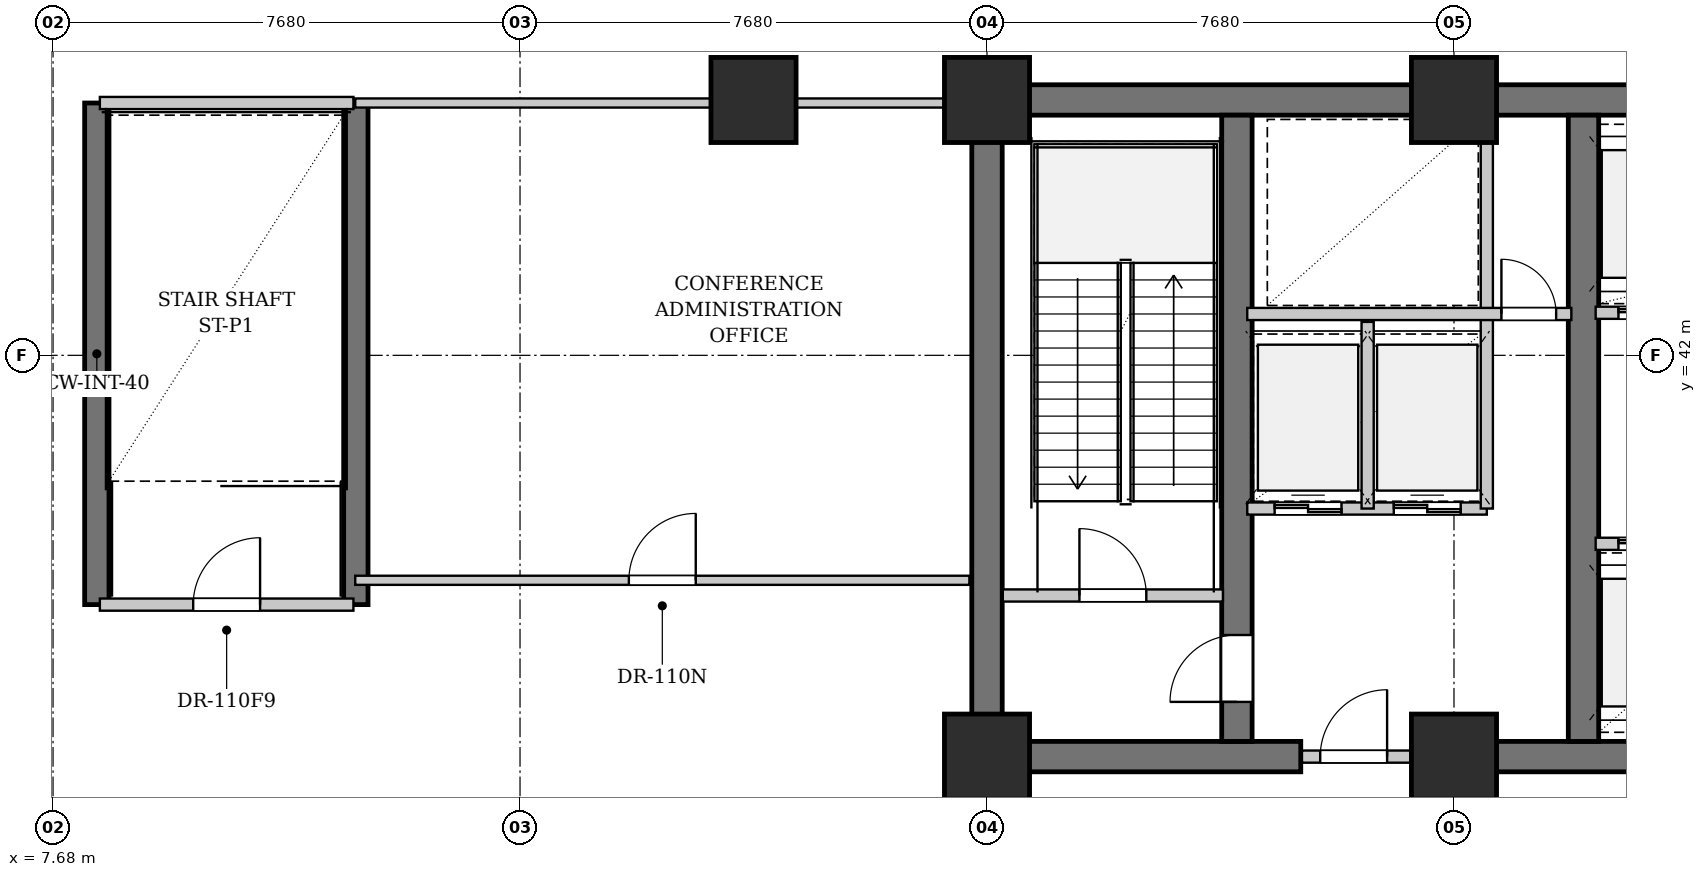
"""IFC4 building model, lengths in metres.
Left out: names, types, materials, properties, quantities, classifications, styles, units other than length and angle.
Written with IfcOpenShell. Run it as: python <this file> out.ifc"""

import sys

from ifc_helpers import new_model, si_unit, direction, frame, frame_2d, origin, origin_2d, place, context, subcontext, project, spatial, rectangle, extrude, element, fill, save


model = new_model("IFC4")
c1 = context("Model", 3, precision=1e-05, world=origin(), true_north=direction((0.0, 1.0)))
c2 = subcontext(c1, "Body", "Model", "MODEL_VIEW")
j1 = project(units=[si_unit("LENGTHUNIT", "METRE"), si_unit("PLANEANGLEUNIT", "RADIAN")], contexts=[c1])
p1 = place(None, origin())
s1 = spatial("IfcSite", under=j1, at=p1, CompositionType="ELEMENT")
p2 = place(p1, origin())
s2 = spatial("IfcBuilding", under=s1, at=p2, CompositionType="ELEMENT")
p3 = place(p2, frame((0.0, 0.0, 25.2)))
s3 = spatial("IfcBuildingStorey", under=s2, at=p3, CompositionType="ELEMENT", Elevation=25.2)
p4 = place(p3, frame((22.79, 46.2, 0.0), z_axis=(0.0, 0.0, 1.0), x_axis=(1.0, 0.0, 0.0)))
e1 = element("IfcWall", 1, at=p4, inside=s3, PredefinedType="SHEAR", context=c2, shape_type="SweptSolid", body=[
    extrude(rectangle(XDim=31.22, YDim=0.5, at=frame_2d((15.61, 0.0))), origin(), (0.0, 0.0, 1.0), 4.78),
])
p5 = place(p3, frame((22.79, 35.4, 0.0), z_axis=(0.0, 0.0, 1.0), x_axis=(1.0, 0.0, 0.0)))
e2 = element("IfcWall", 2, at=p5, inside=s3, PredefinedType="SHEAR", context=c2, shape_type="SweptSolid", body=[
    extrude(rectangle(XDim=5.41, YDim=0.5, at=frame_2d((2.705, 0.0))), origin(), (0.0, 0.0, 1.0), 4.78),
])
p6 = place(p3, frame((30.72, 35.4, 0.0), z_axis=(0.0, 0.0, 1.0), x_axis=(1.0, 0.0, 0.0)))
e3 = element("IfcWall", 3, at=p6, inside=s3, PredefinedType="SHEAR", context=c2, shape_type="SweptSolid", body=[
    extrude(rectangle(XDim=4.88, YDim=0.5, at=frame_2d((2.44, 0.0))), origin(), (0.0, 0.0, 1.0), 4.78),
])
p7 = place(p3, frame((23.04, 35.65, 0.0), z_axis=(0.0, 0.0, 1.0), x_axis=(0.0, 1.0, 0.0)))
e4 = element("IfcWall", 4, at=p7, inside=s3, PredefinedType="SHEAR", context=c2, shape_type="SweptSolid", body=[
    extrude(rectangle(XDim=10.3, YDim=0.5, at=frame_2d((5.15, 0.0))), origin(), (0.0, 0.0, 1.0), 4.78),
])
p8 = place(p3, frame((27.15, 35.65, 0.0), z_axis=(0.0, 0.0, 1.0), x_axis=(0.0, 1.0, 0.0)))
e5 = element("IfcWall", 5, at=p8, inside=s3, PredefinedType="SHEAR", context=c2, shape_type="SweptSolid", body=[
    extrude(rectangle(XDim=10.3, YDim=0.5, at=frame_2d((5.15, 0.0))), origin(), (0.0, 0.0, 1.0), 4.78),
])
p9 = place(p8, frame((0.65, 0.0, 0.0)))
e6 = element("IfcOpeningElement", 6, at=p9, cuts=e5, PredefinedType="OPENING", context=c2, shape_type="SweptSolid", body=[
    extrude(rectangle(XDim=1.1, YDim=2.15, at=frame_2d((0.55, 1.075))), frame((0.0, 0.26, 0.0), z_axis=(0.0, -1.0, 0.0), x_axis=(1.0, 0.0, 0.0)), (0.0, 0.0, 1.0), 0.52),
])
p10 = place(p3, frame((32.85, 35.65, 0.0), z_axis=(0.0, 0.0, 1.0), x_axis=(0.0, 1.0, 0.0)))
e7 = element("IfcWall", 7, at=p10, inside=s3, PredefinedType="SHEAR", context=c2, shape_type="SweptSolid", body=[
    extrude(rectangle(XDim=10.3, YDim=0.5, at=frame_2d((5.15, 0.0))), origin(), (0.0, 0.0, 1.0), 4.78),
])
for number, where, z_axis, x_axis in (
    (8, (8.4, 37.9, 0.0), (0.0, 0.0, 1.0), (0.0, 1.0, 0.0)),
    (9, (12.66, 37.9, 0.0), (0.0, 0.0, 1.0), (0.0, 1.0, 0.0)),
):
    element("IfcWall", number, at=place(p3, frame(where, z_axis=z_axis, x_axis=x_axis)), inside=s3, PredefinedType="SHEAR", context=c2, shape_type="SweptSolid", body=[
        extrude(rectangle(XDim=8.25, YDim=0.4, at=frame_2d((4.125, 0.0))), origin(), (0.0, 0.0, 1.0), 4.78),
    ])
for number, where, z_axis, x_axis in (
    (10, (23.04, 35.4, 0.0), (0.0, 0.0, 1.0), (1.0, 0.0, 0.0)),
    (11, (23.04, 46.2, 0.0), (0.0, 0.0, 1.0), (1.0, 0.0, 0.0)),
    (12, (30.72, 35.4, 0.0), (0.0, 0.0, 1.0), (1.0, 0.0, 0.0)),
    (13, (30.72, 46.2, 0.0), (0.0, 0.0, 1.0), (1.0, 0.0, 0.0)),
    (14, (19.2, 46.2, 0.0), (0.0, 0.0, 1.0), (1.0, 0.0, 0.0)),
):
    element("IfcColumn", number, at=place(p3, frame(where, z_axis=z_axis, x_axis=x_axis)), inside=s3, PredefinedType="COLUMN", context=c2, shape_type="SweptSolid", body=[
        extrude(rectangle(XDim=1.4, YDim=1.4, at=origin_2d()), origin(), (0.0, 0.0, 1.0), 5.2),
    ])
p11 = place(p3, frame((23.3, 38.05, 0.0), z_axis=(0.0, 0.0, 1.0), x_axis=(1.0, 0.0, 0.0)))
e15 = element("IfcWall", 15, at=p11, inside=s3, PredefinedType="PARTITIONING", context=c2, shape_type="SweptSolid", body=[
    extrude(rectangle(XDim=3.62, YDim=0.2, at=frame_2d((1.81, 0.0))), origin(), (0.0, 0.0, 1.0), 4.78),
])
p12 = place(p11, frame((1.26, 0.0, 0.0)))
e16 = element("IfcOpeningElement", 16, at=p12, cuts=e15, PredefinedType="OPENING", context=c2, shape_type="SweptSolid", body=[
    extrude(rectangle(XDim=1.1, YDim=2.15, at=frame_2d((0.55, 1.075))), frame((0.0, 0.11, 0.0), z_axis=(0.0, -1.0, 0.0), x_axis=(1.0, 0.0, 0.0)), (0.0, 0.0, 1.0), 0.22),
])
p13 = place(p3, frame((28.22, 35.4, 0.0), z_axis=(0.0, 0.0, 1.0), x_axis=(1.0, 0.0, 0.0)))
e17 = element("IfcWall", 17, at=p13, inside=s3, PredefinedType="PARTITIONING", context=c2, shape_type="SweptSolid", body=[
    extrude(rectangle(XDim=2.5, YDim=0.2, at=frame_2d((1.25, 0.0))), origin(), (0.0, 0.0, 1.0), 3.767),
])
p14 = place(p13, frame((0.3, 0.0, 0.0)))
e18 = element("IfcOpeningElement", 18, at=p14, cuts=e17, PredefinedType="OPENING", context=c2, shape_type="SweptSolid", body=[
    extrude(rectangle(XDim=1.1, YDim=2.15, at=frame_2d((0.55, 1.075))), frame((0.0, 0.11, 0.0), z_axis=(0.0, -1.0, 0.0), x_axis=(1.0, 0.0, 0.0)), (0.0, 0.0, 1.0), 0.22),
])
p15 = place(p3, frame((27.32, 39.48, 0.0), z_axis=(0.0, 0.0, 1.0), x_axis=(1.0, 0.0, 0.0)))
e19 = element("IfcWall", 19, at=p15, inside=s3, PredefinedType="PARTITIONING", context=c2, shape_type="SweptSolid", body=[
    extrude(rectangle(XDim=3.94, YDim=0.2, at=frame_2d((1.97, 0.0))), origin(), (0.0, 0.0, 1.0), 4.78),
])
p16 = place(p15, frame((0.45, 0.0, 0.0)))
e20 = element("IfcOpeningElement", 20, at=p16, cuts=e19, PredefinedType="OPENING", context=c2, shape_type="SweptSolid", body=[
    extrude(rectangle(XDim=1.1, YDim=2.2, at=frame_2d((0.55, 1.1))), frame((0.0, 0.11, 0.0), z_axis=(0.0, -1.0, 0.0), x_axis=(1.0, 0.0, 0.0)), (0.0, 0.0, 1.0), 0.22),
])
p17 = place(p15, frame((2.41, 0.0, 0.0)))
e21 = element("IfcOpeningElement", 21, at=p17, cuts=e19, PredefinedType="OPENING", context=c2, shape_type="SweptSolid", body=[
    extrude(rectangle(XDim=1.1, YDim=2.2, at=frame_2d((0.55, 1.1))), frame((0.0, 0.11, 0.0), z_axis=(0.0, -1.0, 0.0), x_axis=(1.0, 0.0, 0.0)), (0.0, 0.0, 1.0), 0.22),
])
p18 = place(p3, frame((29.3, 39.48, 0.0), z_axis=(0.0, 0.0, 1.0), x_axis=(0.0, 1.0, 0.0)))
e22 = element("IfcWall", 22, at=p18, inside=s3, PredefinedType="PARTITIONING", context=c2, shape_type="SweptSolid", body=[
    extrude(rectangle(XDim=3.07, YDim=0.2, at=frame_2d((1.535, 0.0))), origin(), (0.0, 0.0, 1.0), 4.78),
])
p19 = place(p3, frame((31.26, 39.48, 0.0), z_axis=(0.0, 0.0, 1.0), x_axis=(0.0, 1.0, 0.0)))
e23 = element("IfcWall", 23, at=p19, inside=s3, PredefinedType="PARTITIONING", context=c2, shape_type="SweptSolid", body=[
    extrude(rectangle(XDim=6.44, YDim=0.2, at=frame_2d((3.22, 0.0))), origin(), (0.0, 0.0, 1.0), 4.78),
])
p20 = place(p3, frame((27.32, 42.68, 0.0), z_axis=(0.0, 0.0, 1.0), x_axis=(1.0, 0.0, 0.0)))
e24 = element("IfcWall", 24, at=p20, inside=s3, PredefinedType="PARTITIONING", context=c2, shape_type="SweptSolid", body=[
    extrude(rectangle(XDim=5.33, YDim=0.2, at=frame_2d((2.665, 0.0))), origin(), (0.0, 0.0, 1.0), 4.78),
])
p21 = place(p20, frame((4.18, 0.0, 0.0)))
e25 = element("IfcOpeningElement", 25, at=p21, cuts=e24, PredefinedType="OPENING", context=c2, shape_type="SweptSolid", body=[
    extrude(rectangle(XDim=0.9, YDim=2.15, at=frame_2d((0.45, 1.075))), frame((0.0, 0.11, 0.0), z_axis=(0.0, -1.0, 0.0), x_axis=(1.0, 0.0, 0.0)), (0.0, 0.0, 1.0), 0.22),
])
p22 = place(p3, frame((33.05, 38.9, 0.0), z_axis=(0.0, 0.0, 1.0), x_axis=(1.0, 0.0, 0.0)))
e26 = element("IfcWall", 26, at=p22, inside=s3, PredefinedType="PARTITIONING", context=c2, shape_type="SweptSolid", body=[
    extrude(rectangle(XDim=3.57, YDim=0.2, at=frame_2d((1.785, 0.0))), origin(), (0.0, 0.0, 1.0), 4.78),
])
p23 = place(p22, frame((0.375, 0.0, 0.0)))
e27 = element("IfcOpeningElement", 27, at=p23, cuts=e26, PredefinedType="OPENING", context=c2, shape_type="SweptSolid", body=[
    extrude(rectangle(XDim=1.0, YDim=2.2, at=frame_2d((0.5, 1.1))), frame((0.0, 0.11, 0.0), z_axis=(0.0, -1.0, 0.0), x_axis=(1.0, 0.0, 0.0)), (0.0, 0.0, 1.0), 0.22),
])
p24 = place(p22, frame((2.125, 0.0, 0.0)))
e28 = element("IfcOpeningElement", 28, at=p24, cuts=e26, PredefinedType="OPENING", context=c2, shape_type="SweptSolid", body=[
    extrude(rectangle(XDim=1.0, YDim=2.2, at=frame_2d((0.5, 1.1))), frame((0.0, 0.11, 0.0), z_axis=(0.0, -1.0, 0.0), x_axis=(1.0, 0.0, 0.0)), (0.0, 0.0, 1.0), 0.22),
])
p25 = place(p3, frame((33.05, 42.7, 0.0), z_axis=(0.0, 0.0, 1.0), x_axis=(1.0, 0.0, 0.0)))
e29 = element("IfcWall", 29, at=p25, inside=s3, PredefinedType="PARTITIONING", context=c2, shape_type="SweptSolid", body=[
    extrude(rectangle(XDim=3.57, YDim=0.2, at=frame_2d((1.785, 0.0))), origin(), (0.0, 0.0, 1.0), 4.78),
])
p26 = place(p25, frame((0.375, 0.0, 0.0)))
e30 = element("IfcOpeningElement", 30, at=p26, cuts=e29, PredefinedType="OPENING", context=c2, shape_type="SweptSolid", body=[
    extrude(rectangle(XDim=1.0, YDim=2.2, at=frame_2d((0.5, 1.1))), frame((0.0, 0.11, 0.0), z_axis=(0.0, -1.0, 0.0), x_axis=(1.0, 0.0, 0.0)), (0.0, 0.0, 1.0), 0.22),
])
p27 = place(p25, frame((2.125, 0.0, 0.0)))
e31 = element("IfcOpeningElement", 31, at=p27, cuts=e29, PredefinedType="OPENING", context=c2, shape_type="SweptSolid", body=[
    extrude(rectangle(XDim=1.0, YDim=2.2, at=frame_2d((0.5, 1.1))), frame((0.0, 0.11, 0.0), z_axis=(0.0, -1.0, 0.0), x_axis=(1.0, 0.0, 0.0)), (0.0, 0.0, 1.0), 0.22),
])
p28 = place(p3, frame((8.45, 37.9, 0.0), z_axis=(0.0, 0.0, 1.0), x_axis=(1.0, 0.0, 0.0)))
e32 = element("IfcWall", 32, at=p28, inside=s3, PredefinedType="PARTITIONING", context=c2, shape_type="SweptSolid", body=[
    extrude(rectangle(XDim=4.17, YDim=0.2, at=frame_2d((2.085, 0.0))), origin(), (0.0, 0.0, 1.0), 4.78),
])
p29 = place(p28, frame((1.535, 0.0, 0.0)))
e33 = element("IfcOpeningElement", 33, at=p29, cuts=e32, PredefinedType="OPENING", context=c2, shape_type="SweptSolid", body=[
    extrude(rectangle(XDim=1.1, YDim=2.15, at=frame_2d((0.55, 1.075))), frame((0.0, 0.11, 0.0), z_axis=(0.0, -1.0, 0.0), x_axis=(1.0, 0.0, 0.0)), (0.0, 0.0, 1.0), 0.22),
])
p30 = place(p3, frame((8.45, 46.15, 0.0), z_axis=(0.0, 0.0, 1.0), x_axis=(1.0, 0.0, 0.0)))
e34 = element("IfcWall", 34, at=p30, inside=s3, PredefinedType="PARTITIONING", context=c2, shape_type="SweptSolid", body=[
    extrude(rectangle(XDim=4.17, YDim=0.2, at=frame_2d((2.085, 0.0))), origin(), (0.0, 0.0, 1.0), 4.78),
])
p31 = place(p3, frame((12.65, 38.3, 0.0), z_axis=(0.0, 0.0, 1.0), x_axis=(1.0, 0.0, 0.0)))
e35 = element("IfcWall", 35, at=p31, inside=s3, PredefinedType="PARTITIONING", context=c2, shape_type="SweptSolid", body=[
    extrude(rectangle(XDim=10.1, YDim=0.15, at=frame_2d((5.05, 0.0))), origin(), (0.0, 0.0, 1.0), 4.78),
])
p32 = place(p31, frame((4.5, 0.0, 0.0)))
e36 = element("IfcOpeningElement", 36, at=p32, cuts=e35, PredefinedType="OPENING", context=c2, shape_type="SweptSolid", body=[
    extrude(rectangle(XDim=1.1, YDim=2.15, at=frame_2d((0.55, 1.075))), frame((0.0, 0.085, 0.0), z_axis=(0.0, -1.0, 0.0), x_axis=(1.0, 0.0, 0.0)), (0.0, 0.0, 1.0), 0.17),
])
p33 = place(p3, frame((12.65, 46.15, 0.0), z_axis=(0.0, 0.0, 1.0), x_axis=(1.0, 0.0, 0.0)))
e37 = element("IfcWall", 37, at=p33, inside=s3, PredefinedType="PARTITIONING", context=c2, shape_type="SweptSolid", body=[
    extrude(rectangle(XDim=10.1, YDim=0.15, at=frame_2d((5.05, 0.0))), origin(), (0.0, 0.0, 1.0), 4.78),
])
p34 = place(p12, origin())
e38 = element("IfcDoor", 38, at=p34, inside=s3, OperationType="SINGLE_SWING_LEFT", PredefinedType="DOOR", context=c2, shape_type="SweptSolid", body=[
    extrude(rectangle(XDim=1.1, YDim=2.15, at=frame_2d((0.55, 1.075))), frame((0.0, 0.025, 0.0), z_axis=(0.0, -1.0, 0.0), x_axis=(1.0, 0.0, 0.0)), (0.0, 0.0, 1.0), 0.05),
])
fill(e16, e38)
p35 = place(p14, origin())
e39 = element("IfcDoor", 39, at=p35, inside=s3, OperationType="SINGLE_SWING_RIGHT", PredefinedType="DOOR", context=c2, shape_type="SweptSolid", body=[
    extrude(rectangle(XDim=1.1, YDim=2.15, at=frame_2d((0.55, 1.075))), frame((0.0, 0.025, 0.0), z_axis=(0.0, -1.0, 0.0), x_axis=(1.0, 0.0, 0.0)), (0.0, 0.0, 1.0), 0.05),
])
fill(e18, e39)
p36 = place(p16, origin())
e40 = element("IfcDoor", 40, at=p36, inside=s3, OperationType="DOUBLE_DOOR_SLIDING", PredefinedType="DOOR", context=c2, shape_type="SweptSolid", body=[
    extrude(rectangle(XDim=1.1, YDim=2.2, at=frame_2d((0.55, 1.1))), frame((0.0, 0.025, 0.0), z_axis=(0.0, -1.0, 0.0), x_axis=(1.0, 0.0, 0.0)), (0.0, 0.0, 1.0), 0.05),
])
fill(e20, e40)
p37 = place(p17, origin())
e41 = element("IfcDoor", 41, at=p37, inside=s3, OperationType="DOUBLE_DOOR_SLIDING", PredefinedType="DOOR", context=c2, shape_type="SweptSolid", body=[
    extrude(rectangle(XDim=1.1, YDim=2.2, at=frame_2d((0.55, 1.1))), frame((0.0, 0.025, 0.0), z_axis=(0.0, -1.0, 0.0), x_axis=(1.0, 0.0, 0.0)), (0.0, 0.0, 1.0), 0.05),
])
fill(e21, e41)
p38 = place(p21, origin())
e42 = element("IfcDoor", 42, at=p38, inside=s3, OperationType="SINGLE_SWING_LEFT", PredefinedType="DOOR", context=c2, shape_type="SweptSolid", body=[
    extrude(rectangle(XDim=0.9, YDim=2.15, at=frame_2d((0.45, 1.075))), frame((0.0, 0.025, 0.0), z_axis=(0.0, -1.0, 0.0), x_axis=(1.0, 0.0, 0.0)), (0.0, 0.0, 1.0), 0.05),
])
fill(e25, e42)
p39 = place(p23, origin())
e43 = element("IfcDoor", 43, at=p39, inside=s3, OperationType="DOUBLE_DOOR_SLIDING", PredefinedType="DOOR", context=c2, shape_type="SweptSolid", body=[
    extrude(rectangle(XDim=1.0, YDim=2.2, at=frame_2d((0.5, 1.1))), frame((0.0, 0.025, 0.0), z_axis=(0.0, -1.0, 0.0), x_axis=(1.0, 0.0, 0.0)), (0.0, 0.0, 1.0), 0.05),
])
fill(e27, e43)
p40 = place(p26, origin())
e44 = element("IfcDoor", 44, at=p40, inside=s3, OperationType="DOUBLE_DOOR_SLIDING", PredefinedType="DOOR", context=c2, shape_type="SweptSolid", body=[
    extrude(rectangle(XDim=1.0, YDim=2.2, at=frame_2d((0.5, 1.1))), frame((0.0, 0.025, 0.0), z_axis=(0.0, -1.0, 0.0), x_axis=(1.0, 0.0, 0.0)), (0.0, 0.0, 1.0), 0.05),
])
fill(e30, e44)
p41 = place(p29, origin())
e45 = element("IfcDoor", 45, at=p41, inside=s3, OperationType="SINGLE_SWING_RIGHT", PredefinedType="DOOR", context=c2, shape_type="SweptSolid", body=[
    extrude(rectangle(XDim=1.1, YDim=2.15, at=frame_2d((0.55, 1.075))), frame((0.0, 0.025, 0.0), z_axis=(0.0, -1.0, 0.0), x_axis=(1.0, 0.0, 0.0)), (0.0, 0.0, 1.0), 0.05),
])
fill(e33, e45)
p42 = place(p32, origin())
e46 = element("IfcDoor", 46, at=p42, inside=s3, OperationType="SINGLE_SWING_RIGHT", PredefinedType="DOOR", context=c2, shape_type="SweptSolid", body=[
    extrude(rectangle(XDim=1.1, YDim=2.15, at=frame_2d((0.55, 1.075))), frame((0.0, 0.025, 0.0), z_axis=(0.0, -1.0, 0.0), x_axis=(1.0, 0.0, 0.0)), (0.0, 0.0, 1.0), 0.05),
])
fill(e36, e46)
p43 = place(p9, origin())
e47 = element("IfcDoor", 47, at=p43, inside=s3, OperationType="SINGLE_SWING_LEFT", PredefinedType="DOOR", context=c2, shape_type="SweptSolid", body=[
    extrude(rectangle(XDim=1.1, YDim=2.15, at=frame_2d((0.55, 1.075))), frame((0.0, 0.025, 0.0), z_axis=(0.0, -1.0, 0.0), x_axis=(1.0, 0.0, 0.0)), (0.0, 0.0, 1.0), 0.05),
])
fill(e6, e47)
save(model, sys.argv[1])
